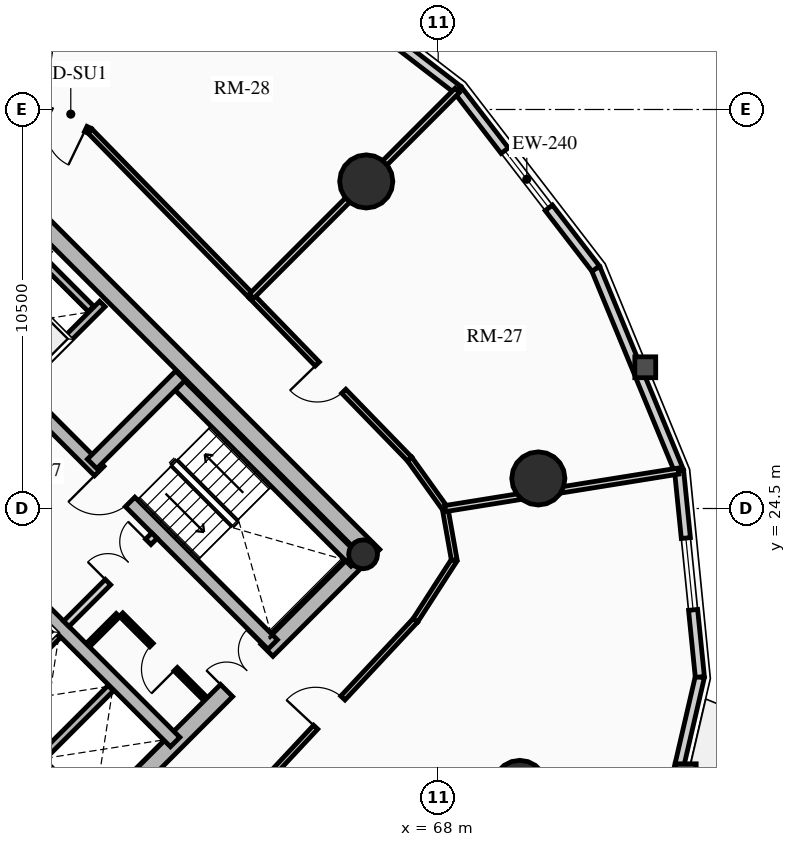
"""IFC4 building model, lengths in metres.
Left out: names, types, materials, properties, quantities, classifications, styles, units other than length and angle.
Written with IfcOpenShell. Run it as: python <this file> out.ifc"""

import sys

from ifc_helpers import new_model, si_unit, direction, frame, frame_2d, origin, origin_2d, place, context, subcontext, project, spatial, rectangle, circle, hollow_circle, extrude, source, transform, mapped, element, fill, save


model = new_model("IFC4")
c1 = context("Model", 3, precision=1e-05, world=origin(), true_north=direction((0.0, 1.0)))
c2 = subcontext(c1, "Body", "Model", "MODEL_VIEW")
j1 = project(units=[si_unit("LENGTHUNIT", "METRE"), si_unit("PLANEANGLEUNIT", "RADIAN")], contexts=[c1])
p1 = place(None, origin())
s1 = spatial("IfcSite", under=j1, at=p1, CompositionType="ELEMENT")
p2 = place(p1, origin())
s2 = spatial("IfcBuilding", under=s1, at=p2, CompositionType="ELEMENT")
p3 = place(p2, frame((0.0, 0.0, 122.53)))
s3 = spatial("IfcBuildingStorey", under=s2, at=p3, CompositionType="ELEMENT", Elevation=122.53)
for number, where, z_axis, x_axis in (
    (1, (58.737, 15.697, 0.0), (0.0, 0.0, 1.0), (-0.707, 0.707, 0.0)),
    (2, (66.303, 23.263, 0.0), (0.0, 0.0, 1.0), (-0.707, 0.707, 0.0)),
):
    element("IfcWall", number, at=place(p3, frame(where, z_axis=z_axis, x_axis=x_axis)), inside=s3, PredefinedType="SHEAR", context=c2, shape_type="SweptSolid", body=[
        extrude(rectangle(XDim=14.2, YDim=0.45, at=frame_2d((7.1, 0.0))), origin(), (0.0, 0.0, 1.0), 2.91),
    ])
p4 = place(p3, frame((58.578, 15.856, 0.0), z_axis=(0.0, 0.0, 1.0), x_axis=(0.707106781187, 0.707106781187, 0.0)))
e3 = element("IfcWall", 3, at=p4, inside=s3, PredefinedType="SHEAR", context=c2, shape_type="SweptSolid", body=[
    extrude(rectangle(XDim=10.7, YDim=0.45, at=frame_2d((5.35, 0.0))), origin(), (0.0, 0.0, 1.0), 2.91),
])
m1 = source(origin(), c2, "Body", "SweptSolid", [
    extrude(rectangle(XDim=1.5, YDim=2.02, at=frame_2d((0.75, 1.01))), frame((0.0, 0.235, 0.0), z_axis=(0.0, -1.0, 0.0), x_axis=(1.0, 0.0, 0.0)), (0.0, 0.0, 1.0), 0.47),
])
p5 = place(p4, frame((5.45, 0.0, 0.0)))
e4 = element("IfcOpeningElement", 4, at=p5, cuts=e3, PredefinedType="OPENING", context=c2, shape_type="MappedRepresentation", body=[
    mapped(m1, transform((0.0, 0.0, 0.0), x_axis=(1.0, 0.0, 0.0), y_axis=(0.0, 1.0, 0.0), z_axis=(0.0, 0.0, 1.0), scale=1.0)),
])
p6 = place(p3, frame((61.078, 18.355, 0.0), z_axis=(0.0, 0.0, 1.0), x_axis=(-0.707106781187, 0.707106781187, 0.0)))
e5 = element("IfcWall", 5, at=p6, inside=s3, PredefinedType="SHEAR", context=c2, shape_type="SweptSolid", body=[
    extrude(rectangle(XDim=13.75, YDim=0.35, at=frame_2d((6.875, 0.0))), origin(), (0.0, 0.0, 1.0), 2.91),
])
m2 = source(origin(), c2, "Body", "SweptSolid", [
    extrude(rectangle(XDim=1.1, YDim=2.015, at=frame_2d((0.55, 1.007))), frame((0.0, 0.185, 0.0), z_axis=(0.0, -1.0, 0.0), x_axis=(1.0, 0.0, 0.0)), (0.0, 0.0, 1.0), 0.37),
])
p7 = place(p6, frame((4.875, 0.0, 0.0)))
e6 = element("IfcOpeningElement", 6, at=p7, cuts=e5, PredefinedType="OPENING", context=c2, shape_type="MappedRepresentation", body=[
    mapped(m2, transform((0.0, 0.0, 0.0), x_axis=(1.0, 0.0, 0.0), y_axis=(0.0, 1.0, 0.0), z_axis=(0.0, 0.0, 1.0), scale=1.0)),
])
m3 = source(origin(), c2, "Body", "SweptSolid", [
    extrude(rectangle(XDim=1.15, YDim=2.02, at=frame_2d((0.575, 1.01))), frame((0.0, 0.185, 0.0), z_axis=(0.0, -1.0, 0.0), x_axis=(1.0, 0.0, 0.0)), (0.0, 0.0, 1.0), 0.37),
])
p8 = place(p6, frame((7.295, 0.0, 0.0)))
e7 = element("IfcOpeningElement", 7, at=p8, cuts=e5, PredefinedType="OPENING", context=c2, shape_type="MappedRepresentation", body=[
    mapped(m3, transform((0.0, 0.0, 0.0), x_axis=(1.0, 0.0, 0.0), y_axis=(0.0, 1.0, 0.0), z_axis=(0.0, 0.0, 1.0), scale=1.0)),
])
p9 = place(p3, frame((63.645, 20.922, 0.0), z_axis=(0.0, 0.0, 1.0), x_axis=(-0.707106781187, 0.707106781187, 0.0)))
e8 = element("IfcWall", 8, at=p9, inside=s3, PredefinedType="SHEAR", context=c2, shape_type="SweptSolid", body=[
    extrude(rectangle(XDim=13.75, YDim=0.35, at=frame_2d((6.875, 0.0))), origin(), (0.0, 0.0, 1.0), 2.91),
])
p10 = place(p9, frame((10.0, 0.0, 0.0)))
e9 = element("IfcOpeningElement", 9, at=p10, cuts=e8, PredefinedType="OPENING", context=c2, shape_type="MappedRepresentation", body=[
    mapped(m2, transform((0.0, 0.0, 0.0), x_axis=(1.0, 0.0, 0.0), y_axis=(0.0, 1.0, 0.0), z_axis=(0.0, 0.0, 1.0), scale=1.0)),
])
p11 = place(p9, frame((12.0, 0.0, 0.0)))
e10 = element("IfcOpeningElement", 10, at=p11, cuts=e8, PredefinedType="OPENING", context=c2, shape_type="MappedRepresentation", body=[
    mapped(m2, transform((0.0, 0.0, 0.0), x_axis=(1.0, 0.0, 0.0), y_axis=(0.0, 1.0, 0.0), z_axis=(0.0, 0.0, 1.0), scale=1.0)),
])
p12 = place(p9, frame((5.305, 0.0, 0.0)))
e11 = element("IfcOpeningElement", 11, at=p12, cuts=e8, PredefinedType="OPENING", context=c2, shape_type="MappedRepresentation", body=[
    mapped(m3, transform((0.0, 0.0, 0.0), x_axis=(1.0, 0.0, 0.0), y_axis=(0.0, 1.0, 0.0), z_axis=(0.0, 0.0, 1.0), scale=1.0)),
])
p13 = place(p3, frame((65.83, 23.107, 0.0), z_axis=(0.0, 0.0, 1.0), x_axis=(-0.707088616009, 0.707124945897, 0.0)))
e12 = element("IfcWall", 12, at=p13, inside=s3, PredefinedType="SHEAR", context=c2, shape_type="SweptSolid", body=[
    extrude(rectangle(XDim=6.72, YDim=0.35, at=frame_2d((3.36, 0.0))), origin(), (0.0, 0.0, 1.0), 2.91),
])
p14 = place(p3, frame((58.893, 25.674, 0.0), z_axis=(0.0, 0.0, 1.0), x_axis=(0.707106781187, 0.707106781187, 0.0)))
e13 = element("IfcWall", 13, at=p14, inside=s3, PredefinedType="SHEAR", context=c2, shape_type="SweptSolid", body=[
    extrude(rectangle(XDim=3.285, YDim=0.35, at=frame_2d((1.643, 0.0))), origin(), (0.0, 0.0, 1.0), 2.91),
])
p15 = place(p3, frame((66.024, 23.294, 0.0), z_axis=(0.0, 0.0, 1.0), x_axis=(0.707106781187, 0.707106781187, 0.0)))
e14 = element("IfcColumn", 14, at=p15, inside=s3, PredefinedType="COLUMN", context=c2, shape_type="SweptSolid", body=[
    extrude(hollow_circle(Radius=0.38, WallThickness=0.032, at=origin_2d()), origin(), (0.0, 0.0, 1.0), 2.91),
])
for number, where, z_axis, x_axis in (
    (15, (66.107, 33.107, 0.0), (0.0, 0.0, 1.0), (1.0, 0.0, 0.0)),
    (16, (70.146, 17.173, 0.0), (0.0, 0.0, 1.0), (1.0, 0.0, 0.0)),
    (17, (70.635, 25.291, 0.0), (0.0, 0.0, 1.0), (1.0, 0.0, 0.0)),
):
    element("IfcColumn", number, at=place(p3, frame(where, z_axis=z_axis, x_axis=x_axis)), inside=s3, PredefinedType="USERDEFINED", context=c2, shape_type="SweptSolid", body=[
        extrude(circle(Radius=0.7, at=origin_2d()), origin(), (0.0, 0.0, 1.0), 2.91),
    ])
p16 = place(p3, frame((63.811, 39.145, 0.0), z_axis=(0.0, 0.0, 1.0), x_axis=(0.791982052206, -0.61054437102, 0.0)))
e18 = element("IfcWall", 18, at=p16, inside=s3, PredefinedType="SOLIDWALL", context=c2, shape_type="SweptSolid", body=[
    extrude(rectangle(XDim=5.942, YDim=0.24, at=frame_2d((2.971, 0.0))), origin(), (0.0, 0.0, 1.0), 2.139),
])
p17 = place(p3, frame((74.885, 20.067, 0.0), z_axis=(0.0, 0.0, 1.0), x_axis=(-0.225834725257, -0.974165631126, 0.0)))
e19 = element("IfcWall", 19, at=p17, inside=s3, PredefinedType="SOLIDWALL", context=c2, shape_type="SweptSolid", body=[
    extrude(rectangle(XDim=5.119, YDim=0.24, at=frame_2d((2.56, 0.0))), origin(), (0.0, 0.0, 1.0), 2.139),
])
p18 = place(p3, frame((74.339, 25.487, 0.0), z_axis=(0.0, 0.0, 1.0), x_axis=(0.10015591906, -0.994971754311, 0.0)))
e20 = element("IfcWall", 20, at=p18, inside=s3, PredefinedType="SOLIDWALL", context=c2, shape_type="SweptSolid", body=[
    extrude(rectangle(XDim=5.448, YDim=0.24, at=frame_2d((2.724, 0.0))), origin(), (0.0, 0.0, 1.0), 2.139),
])
m4 = source(origin(), c2, "Body", "SweptSolid", [
    extrude(rectangle(XDim=1.9, YDim=1.35, at=frame_2d((0.95, 0.675))), frame((0.0, 0.13, 0.0), z_axis=(0.0, -1.0, 0.0), x_axis=(1.0, 0.0, 0.0)), (0.0, 0.0, 1.0), 0.26),
])
p19 = place(p18, frame((1.774, 0.0, 0.65)))
e21 = element("IfcOpeningElement", 21, at=p19, cuts=e20, PredefinedType="OPENING", context=c2, shape_type="MappedRepresentation", body=[
    mapped(m4, transform((0.0, 0.0, 0.0), x_axis=(1.0, 0.0, 0.0), y_axis=(0.0, 1.0, 0.0), z_axis=(0.0, 0.0, 1.0), scale=1.0)),
])
p20 = place(p3, frame((72.145, 30.811, 0.0), z_axis=(0.0, 0.0, 1.0), x_axis=(0.381027003055, -0.924563909604, 0.0)))
e22 = element("IfcWall", 22, at=p20, inside=s3, PredefinedType="SOLIDWALL", context=c2, shape_type="SweptSolid", body=[
    extrude(rectangle(XDim=5.758, YDim=0.24, at=frame_2d((2.879, 0.0))), origin(), (0.0, 0.0, 1.0), 2.139),
])
p21 = place(p3, frame((68.517, 35.517, 0.0), z_axis=(0.0, 0.0, 1.0), x_axis=(0.61054437102, -0.791982052206, 0.0)))
e23 = element("IfcWall", 23, at=p21, inside=s3, PredefinedType="SOLIDWALL", context=c2, shape_type="SweptSolid", body=[
    extrude(rectangle(XDim=5.942, YDim=0.24, at=frame_2d((2.971, 0.0))), origin(), (0.0, 0.0, 1.0), 2.139),
])
p22 = place(p21, frame((2.021, 0.0, 0.65)))
e24 = element("IfcOpeningElement", 24, at=p22, cuts=e23, PredefinedType="OPENING", context=c2, shape_type="MappedRepresentation", body=[
    mapped(m4, transform((0.0, 0.0, 0.0), x_axis=(1.0, 0.0, 0.0), y_axis=(0.0, 1.0, 0.0), z_axis=(0.0, 0.0, 1.0), scale=1.0)),
])
p23 = place(p3, frame((55.888, 19.069, 0.0), z_axis=(0.0, 0.0, 1.0), x_axis=(0.707106781187, 0.707106781187, 0.0)))
e25 = element("IfcWall", 25, at=p23, inside=s3, PredefinedType="SHEAR", context=c2, shape_type="SweptSolid", body=[
    extrude(rectangle(XDim=2.97, YDim=0.2, at=frame_2d((1.485, 0.0))), origin(), (0.0, 0.0, 1.0), 2.91),
])
p24 = place(p3, frame((57.284, 17.673, 0.0), z_axis=(0.0, 0.0, 1.0), x_axis=(0.707147878904, 0.70706568108, 0.0)))
e26 = element("IfcWall", 26, at=p24, inside=s3, PredefinedType="SHEAR", context=c2, shape_type="SweptSolid", body=[
    extrude(rectangle(XDim=2.97, YDim=0.2, at=frame_2d((1.485, 0.0))), origin(), (0.0, 0.0, 1.0), 2.91),
])
p25 = place(p3, frame((58.737, 16.644, 0.0), z_axis=(0.0, 0.0, 1.0), x_axis=(-0.707032117043, 0.707181437447, 0.0)))
e27 = element("IfcWall", 27, at=p25, inside=s3, PredefinedType="SHEAR", context=c2, shape_type="SweptSolid", body=[
    extrude(rectangle(XDim=1.635, YDim=0.2, at=frame_2d((0.817, 0.0))), origin(), (0.0, 0.0, 1.0), 2.91),
])
p26 = place(p3, frame((57.062, 27.781, 0.0), z_axis=(0.0, 0.0, 1.0), x_axis=(0.707106781187, 0.707106781187, 0.0)))
e28 = element("IfcWall", 28, at=p26, inside=s3, PredefinedType="SHEAR", context=c2, shape_type="SweptSolid", body=[
    extrude(rectangle(XDim=2.97, YDim=0.2, at=frame_2d((1.485, 0.0))), origin(), (0.0, 0.0, 1.0), 2.91),
])
p27 = place(p3, frame((58.865, 29.754, 0.0), z_axis=(0.0, 0.0, 1.0), x_axis=(-0.707174411312, 0.707039144592, 0.0)))
e29 = element("IfcWall", 29, at=p27, inside=s3, PredefinedType="SHEAR", context=c2, shape_type="SweptSolid", body=[
    extrude(rectangle(XDim=1.805, YDim=0.2, at=frame_2d((0.902, 0.0))), origin(), (0.0, 0.0, 1.0), 2.91),
])
p28 = place(p3, frame((58.214, 21.467, 0.0), z_axis=(0.0, 0.0, 1.0), x_axis=(0.707106781187, 0.707106781187, 0.0)))
e30 = element("IfcWall", 30, at=p28, inside=s3, PredefinedType="PARTITIONING", context=c2, shape_type="SweptSolid", body=[
    extrude(rectangle(XDim=3.28, YDim=0.2, at=frame_2d((1.64, 0.0))), origin(), (0.0, 0.0, 1.0), 2.615),
])
m5 = source(origin(), c2, "Body", "SweptSolid", [
    extrude(rectangle(XDim=1.5, YDim=2.02, at=frame_2d((0.75, 1.01))), frame((0.0, 0.11, 0.0), z_axis=(0.0, -1.0, 0.0), x_axis=(1.0, 0.0, 0.0)), (0.0, 0.0, 1.0), 0.22),
])
p29 = place(p28, frame((1.55, 0.0, 0.0)))
e31 = element("IfcOpeningElement", 31, at=p29, cuts=e30, PredefinedType="OPENING", context=c2, shape_type="MappedRepresentation", body=[
    mapped(m5, transform((0.0, 0.0, 0.0), x_axis=(1.0, 0.0, 0.0), y_axis=(0.0, 1.0, 0.0), z_axis=(0.0, 0.0, 1.0), scale=1.0)),
])
p30 = place(p3, frame((61.835, 19.529, 0.0), z_axis=(0.0, 0.0, 1.0), x_axis=(-0.707146413884, 0.707067146267, 0.0)))
e32 = element("IfcWall", 32, at=p30, inside=s3, PredefinedType="PARTITIONING", context=c2, shape_type="SweptSolid", body=[
    extrude(rectangle(XDim=3.08, YDim=0.125, at=frame_2d((1.54, 0.0))), origin(), (0.0, 0.0, 1.0), 2.615),
])
m6 = source(origin(), c2, "Body", "SweptSolid", [
    extrude(rectangle(XDim=0.9, YDim=2.005, at=frame_2d((0.45, 1.002))), frame((0.0, 0.073, 0.0), z_axis=(0.0, -1.0, 0.0), x_axis=(1.0, 0.0, 0.0)), (0.0, 0.0, 1.0), 0.145),
])
p31 = place(p30, frame((1.05, 0.0, 0.0)))
e33 = element("IfcOpeningElement", 33, at=p31, cuts=e32, PredefinedType="OPENING", context=c2, shape_type="MappedRepresentation", body=[
    mapped(m6, transform((0.0, 0.0, 0.0), x_axis=(1.0, 0.0, 0.0), y_axis=(0.0, 1.0, 0.0), z_axis=(0.0, 0.0, 1.0), scale=1.0)),
])
p32 = place(p3, frame((58.794, 20.915, 0.0), z_axis=(0.0, 0.0, 1.0), x_axis=(0.707106781187, 0.707106781187, 0.0)))
e34 = element("IfcWall", 34, at=p32, inside=s3, PredefinedType="PARTITIONING", context=c2, shape_type="SweptSolid", body=[
    extrude(rectangle(XDim=1.1, YDim=0.125, at=frame_2d((0.55, 0.0))), origin(), (0.0, 0.0, 1.0), 2.615),
])
p33 = place(p3, frame((63.086, 30.086, 0.0), z_axis=(0.0, 0.0, 1.0), x_axis=(-0.699032802832, 0.715089603172, 0.0)))
e35 = element("IfcWall", 35, at=p33, inside=s3, PredefinedType="PARTITIONING", context=c2, shape_type="SweptSolid", body=[
    extrude(rectangle(XDim=6.082, YDim=0.15, at=frame_2d((3.041, 0.0))), origin(), (0.0, 0.0, 1.0), 2.185),
])
p34 = place(p3, frame((58.835, 34.435, 0.0), z_axis=(0.0, 0.0, 1.0), x_axis=(-0.900352167336, 0.4351620098, 0.0)))
e36 = element("IfcWall", 36, at=p34, inside=s3, PredefinedType="PARTITIONING", context=c2, shape_type="SweptSolid", body=[
    extrude(rectangle(XDim=1.488, YDim=0.15, at=frame_2d((0.744, 0.0))), origin(), (0.0, 0.0, 1.0), 2.185),
])
m7 = source(origin(), c2, "Body", "SweptSolid", [
    extrude(rectangle(XDim=1.05, YDim=2.015, at=frame_2d((0.525, 1.007))), frame((0.0, 0.085, 0.0), z_axis=(0.0, -1.0, 0.0), x_axis=(1.0, 0.0, 0.0)), (0.0, 0.0, 1.0), 0.17),
])
p35 = place(p34, frame((0.12, 0.0, 0.0)))
e37 = element("IfcOpeningElement", 37, at=p35, cuts=e36, PredefinedType="OPENING", context=c2, shape_type="MappedRepresentation", body=[
    mapped(m7, transform((0.0, 0.0, 0.0), x_axis=(1.0, 0.0, 0.0), y_axis=(0.0, 1.0, 0.0), z_axis=(0.0, 0.0, 1.0), scale=1.0)),
])
p36 = place(p3, frame((62.867, 16.702, 0.0), z_axis=(0.0, 0.0, 1.0), x_axis=(0.682449206191, 0.73093302085, 0.0)))
e38 = element("IfcWall", 38, at=p36, inside=s3, PredefinedType="PARTITIONING", context=c2, shape_type="SweptSolid", body=[
    extrude(rectangle(XDim=6.642, YDim=0.15, at=frame_2d((3.321, 0.0))), origin(), (0.0, 0.0, 1.0), 2.185),
])
p37 = place(p36, frame((2.796, 0.0, 0.0)))
e39 = element("IfcOpeningElement", 39, at=p37, cuts=e38, PredefinedType="OPENING", context=c2, shape_type="MappedRepresentation", body=[
    mapped(m7, transform((0.0, 0.0, 0.0), x_axis=(1.0, 0.0, 0.0), y_axis=(0.0, 1.0, 0.0), z_axis=(0.0, 0.0, 1.0), scale=1.0)),
])
p38 = place(p3, frame((67.4, 21.556, 0.0), z_axis=(0.0, 0.0, 1.0), x_axis=(0.542247692187, 0.840218686009, 0.0)))
e40 = element("IfcWall", 40, at=p38, inside=s3, PredefinedType="PARTITIONING", context=c2, shape_type="SweptSolid", body=[
    extrude(rectangle(XDim=1.887, YDim=0.15, at=frame_2d((0.943, 0.0))), origin(), (0.0, 0.0, 1.0), 2.185),
])
p39 = place(p3, frame((68.423, 23.142, 0.0), z_axis=(0.0, 0.0, 1.0), x_axis=(-0.174796562349, 0.984604571283, 0.0)))
e41 = element("IfcWall", 41, at=p39, inside=s3, PredefinedType="PARTITIONING", context=c2, shape_type="SweptSolid", body=[
    extrude(rectangle(XDim=1.377, YDim=0.15, at=frame_2d((0.688, 0.0))), origin(), (0.0, 0.0, 1.0), 2.185),
])
p40 = place(p3, frame((68.182, 24.498, 0.0), z_axis=(0.0, 0.0, 1.0), x_axis=(-0.582532339525, 0.812807525437, 0.0)))
e42 = element("IfcWall", 42, at=p40, inside=s3, PredefinedType="PARTITIONING", context=c2, shape_type="SweptSolid", body=[
    extrude(rectangle(XDim=1.605, YDim=0.15, at=frame_2d((0.803, 0.0))), origin(), (0.0, 0.0, 1.0), 2.185),
])
p41 = place(p3, frame((67.247, 25.802, 0.0), z_axis=(0.0, 0.0, 1.0), x_axis=(-0.696771261687, 0.71729339108, 0.0)))
e43 = element("IfcWall", 43, at=p41, inside=s3, PredefinedType="PARTITIONING", context=c2, shape_type="SweptSolid", body=[
    extrude(rectangle(XDim=5.972, YDim=0.15, at=frame_2d((2.986, 0.0))), origin(), (0.0, 0.0, 1.0), 2.615),
])
m8 = source(origin(), c2, "Body", "SweptSolid", [
    extrude(rectangle(XDim=1.0, YDim=2.015, at=frame_2d((0.5, 1.007))), frame((0.0, 0.085, 0.0), z_axis=(0.0, -1.0, 0.0), x_axis=(1.0, 0.0, 0.0)), (0.0, 0.0, 1.0), 0.17),
])
p42 = place(p41, frame((2.486, 0.0, 0.0)))
e44 = element("IfcOpeningElement", 44, at=p42, cuts=e43, PredefinedType="OPENING", context=c2, shape_type="MappedRepresentation", body=[
    mapped(m8, transform((0.0, 0.0, 0.0), x_axis=(1.0, 0.0, 0.0), y_axis=(0.0, 1.0, 0.0), z_axis=(0.0, 0.0, 1.0), scale=1.0)),
])
p43 = place(p3, frame((63.086, 30.086, 0.0), z_axis=(0.0, 0.0, 1.0), x_axis=(0.707106781187, 0.707106781187, 0.0)))
e45 = element("IfcWall", 45, at=p43, inside=s3, PredefinedType="PARTITIONING", context=c2, shape_type="SweptSolid", body=[
    extrude(rectangle(XDim=7.661, YDim=0.16, at=frame_2d((3.831, 0.0))), origin(), (0.0, 0.0, 1.0), 2.139),
])
p44 = place(p3, frame((57.495, 35.083, 0.0), z_axis=(0.0, 0.0, 1.0), x_axis=(0.156619688156, 0.987658986332, 0.0)))
e46 = element("IfcWall", 46, at=p44, inside=s3, PredefinedType="PARTITIONING", context=c2, shape_type="SweptSolid", body=[
    extrude(rectangle(XDim=6.315, YDim=0.16, at=frame_2d((3.157, 0.0))), origin(), (0.0, 0.0, 1.0), 2.139),
])
p45 = place(p3, frame((68.182, 24.498, 0.0), z_axis=(0.0, 0.0, 1.0), x_axis=(0.987330591038, 0.158676727973, 0.0)))
e47 = element("IfcWall", 47, at=p45, inside=s3, PredefinedType="PARTITIONING", context=c2, shape_type="SweptSolid", body=[
    extrude(rectangle(XDim=6.216, YDim=0.16, at=frame_2d((3.108, 0.0))), origin(), (0.0, 0.0, 1.0), 2.139),
])
m9 = source(origin(), c2, "Body", "SweptSolid", [
    extrude(rectangle(XDim=1.9, YDim=1.35, at=frame_2d((0.95, 0.675))), frame((0.0, 0.03, 0.0), z_axis=(0.0, -1.0, 0.0), x_axis=(1.0, 0.0, 0.0)), (0.0, 0.0, 1.0), 0.06),
])
p46 = place(p19, origin())
e48 = element("IfcWindow", 48, at=p46, inside=s3, PartitioningType="DOUBLE_PANEL_VERTICAL", PredefinedType="WINDOW", context=c2, shape_type="MappedRepresentation", body=[
    mapped(m9, transform((0.0, 0.0, 0.0), x_axis=(1.0, 0.0, 0.0), y_axis=(0.0, 1.0, 0.0), z_axis=(0.0, 0.0, 1.0), scale=1.0)),
])
fill(e21, e48)
p47 = place(p22, origin())
e49 = element("IfcWindow", 49, at=p47, inside=s3, PartitioningType="DOUBLE_PANEL_VERTICAL", PredefinedType="WINDOW", context=c2, shape_type="MappedRepresentation", body=[
    mapped(m9, transform((0.0, 0.0, 0.0), x_axis=(1.0, 0.0, 0.0), y_axis=(0.0, 1.0, 0.0), z_axis=(0.0, 0.0, 1.0), scale=1.0)),
])
fill(e24, e49)
m10 = source(origin(), c2, "Body", "SweptSolid", [
    extrude(rectangle(XDim=1.15, YDim=2.02, at=frame_2d((0.575, 1.01))), frame((0.0, 0.025, 0.0), z_axis=(0.0, -1.0, 0.0), x_axis=(1.0, 0.0, 0.0)), (0.0, 0.0, 1.0), 0.05),
])
p48 = place(p12, origin())
e50 = element("IfcDoor", 50, at=p48, inside=s3, OperationType="SINGLE_SWING_RIGHT", PredefinedType="DOOR", context=c2, shape_type="MappedRepresentation", body=[
    mapped(m10, transform((0.0, 0.0, 0.0), x_axis=(1.0, 0.0, 0.0), y_axis=(0.0, 1.0, 0.0), z_axis=(0.0, 0.0, 1.0), scale=1.0)),
])
fill(e11, e50)
m11 = source(origin(), c2, "Body", "SweptSolid", [
    extrude(rectangle(XDim=1.5, YDim=2.02, at=frame_2d((0.75, 1.01))), frame((0.0, 0.025, 0.0), z_axis=(0.0, -1.0, 0.0), x_axis=(1.0, 0.0, 0.0)), (0.0, 0.0, 1.0), 0.05),
])
p49 = place(p5, origin())
e51 = element("IfcDoor", 51, at=p49, inside=s3, OperationType="DOUBLE_DOOR_SINGLE_SWING", PredefinedType="DOOR", context=c2, shape_type="MappedRepresentation", body=[
    mapped(m11, transform((0.0, 0.0, 0.0), x_axis=(1.0, 0.0, 0.0), y_axis=(0.0, 1.0, 0.0), z_axis=(0.0, 0.0, 1.0), scale=1.0)),
])
fill(e4, e51)
p50 = place(p29, origin())
e52 = element("IfcDoor", 52, at=p50, inside=s3, OperationType="DOUBLE_DOOR_SINGLE_SWING", PredefinedType="DOOR", context=c2, shape_type="MappedRepresentation", body=[
    mapped(m11, transform((0.0, 0.0, 0.0), x_axis=(1.0, 0.0, 0.0), y_axis=(0.0, 1.0, 0.0), z_axis=(0.0, 0.0, 1.0), scale=1.0)),
])
fill(e31, e52)
m12 = source(origin(), c2, "Body", "SweptSolid", [
    extrude(rectangle(XDim=0.9, YDim=2.005, at=frame_2d((0.45, 1.002))), frame((0.0, 0.025, 0.0), z_axis=(0.0, -1.0, 0.0), x_axis=(1.0, 0.0, 0.0)), (0.0, 0.0, 1.0), 0.05),
])
p51 = place(p31, origin())
e53 = element("IfcDoor", 53, at=p51, inside=s3, OperationType="SINGLE_SWING_LEFT", PredefinedType="DOOR", context=c2, shape_type="MappedRepresentation", body=[
    mapped(m12, transform((0.0, 0.0, 0.0), x_axis=(1.0, 0.0, 0.0), y_axis=(0.0, 1.0, 0.0), z_axis=(0.0, 0.0, 1.0), scale=1.0)),
])
fill(e33, e53)
m13 = source(origin(), c2, "Body", "SweptSolid", [
    extrude(rectangle(XDim=1.05, YDim=2.015, at=frame_2d((0.525, 1.007))), frame((0.0, 0.025, 0.0), z_axis=(0.0, -1.0, 0.0), x_axis=(1.0, 0.0, 0.0)), (0.0, 0.0, 1.0), 0.05),
])
p52 = place(p37, origin())
e54 = element("IfcDoor", 54, at=p52, inside=s3, OperationType="SINGLE_SWING_LEFT", PredefinedType="DOOR", context=c2, shape_type="MappedRepresentation", body=[
    mapped(m13, transform((0.0, 0.0, 0.0), x_axis=(1.0, 0.0, 0.0), y_axis=(0.0, 1.0, 0.0), z_axis=(0.0, 0.0, 1.0), scale=1.0)),
])
fill(e39, e54)
m14 = source(origin(), c2, "Body", "SweptSolid", [
    extrude(rectangle(XDim=1.0, YDim=2.015, at=frame_2d((0.5, 1.007))), frame((0.0, 0.025, 0.0), z_axis=(0.0, -1.0, 0.0), x_axis=(1.0, 0.0, 0.0)), (0.0, 0.0, 1.0), 0.05),
])
p53 = place(p42, origin())
e55 = element("IfcDoor", 55, at=p53, inside=s3, OperationType="SINGLE_SWING_RIGHT", PredefinedType="DOOR", context=c2, shape_type="MappedRepresentation", body=[
    mapped(m14, transform((0.0, 0.0, 0.0), x_axis=(1.0, 0.0, 0.0), y_axis=(0.0, 1.0, 0.0), z_axis=(0.0, 0.0, 1.0), scale=1.0)),
])
fill(e44, e55)
p54 = place(p35, origin())
e56 = element("IfcDoor", 56, at=p54, inside=s3, OperationType="SINGLE_SWING_LEFT", PredefinedType="DOOR", context=c2, shape_type="MappedRepresentation", body=[
    mapped(m13, transform((0.0, 0.0, 0.0), x_axis=(1.0, 0.0, 0.0), y_axis=(0.0, 1.0, 0.0), z_axis=(0.0, 0.0, 1.0), scale=1.0)),
])
fill(e37, e56)
save(model, sys.argv[1])
